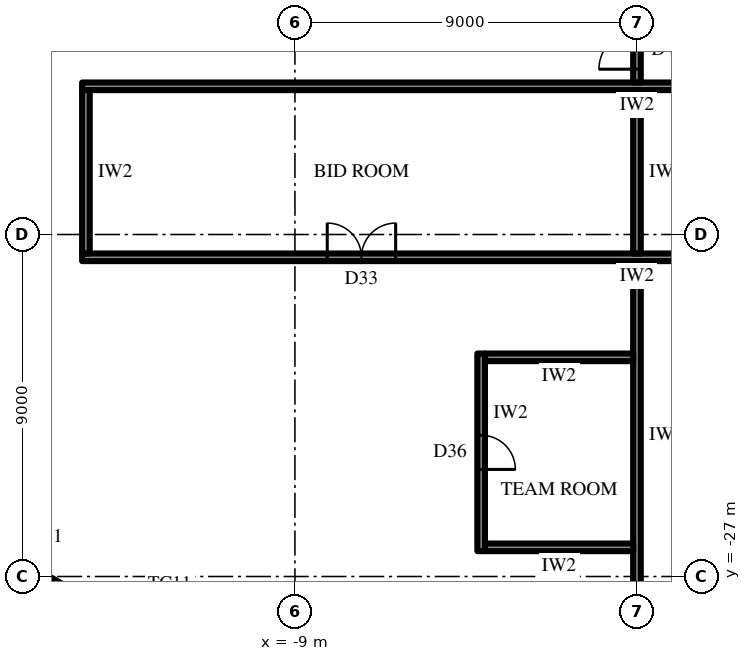
"""IFC4 building model, lengths in metres.
Left out: names, types, materials, properties, quantities, classifications, styles, units other than length and angle.
Written with IfcOpenShell. Run it as: python <this file> out.ifc"""

import sys

from ifc_helpers import new_model, si_unit, direction, frame, frame_2d, origin, place, context, subcontext, project, spatial, rectangle, extrude, element, fill, save


model = new_model("IFC4")
c1 = context("Model", 3, precision=1e-05, world=origin(), true_north=direction((0.0, 1.0)))
c2 = subcontext(c1, "Body", "Model", "MODEL_VIEW")
j1 = project(units=[si_unit("LENGTHUNIT", "METRE"), si_unit("PLANEANGLEUNIT", "RADIAN")], contexts=[c1])
p1 = place(None, origin())
s1 = spatial("IfcSite", under=j1, at=p1, CompositionType="ELEMENT")
p2 = place(p1, origin())
s2 = spatial("IfcBuilding", under=s1, at=p2, CompositionType="ELEMENT")
p3 = place(p2, frame((0.0, 0.0, 257.5)))
s3 = spatial("IfcBuildingStorey", under=s2, at=p3, CompositionType="ELEMENT", Elevation=257.5)
p4 = place(p3, frame((-18.707, -25.299, 0.0), z_axis=(0.0, 0.0, 1.0), x_axis=(0.866010973379, -0.500024993363, 0.0)))
e1 = element("IfcWall", 1, at=p4, inside=s3, PredefinedType="SOLIDWALL", context=c2, shape_type="SweptSolid", body=[
    extrude(rectangle(XDim=7.102, YDim=0.3, at=frame_2d((3.551, 0.0))), origin(), (0.0, 0.0, 1.0), 2.8),
])
p5 = place(p3, frame((14.6, -14.1, 0.0), z_axis=(0.0, 0.0, 1.0), x_axis=(-1.0, 0.0, 0.0)))
e2 = element("IfcWall", 2, at=p5, inside=s3, PredefinedType="PARTITIONING", context=c2, shape_type="SweptSolid", body=[
    extrude(rectangle(XDim=29.2, YDim=0.2, at=frame_2d((14.6, 0.0))), origin(), (0.0, 0.0, 1.0), 4.0),
])
p6 = place(p3, frame((14.6, -18.6, 0.0), z_axis=(0.0, 0.0, 1.0), x_axis=(-1.0, 0.0, 0.0)))
e3 = element("IfcWall", 3, at=p6, inside=s3, PredefinedType="PARTITIONING", context=c2, shape_type="SweptSolid", body=[
    extrude(rectangle(XDim=29.2, YDim=0.2, at=frame_2d((14.6, 0.0))), origin(), (0.0, 0.0, 1.0), 4.0),
])
p7 = place(p6, frame((6.45, 0.0, 0.0)))
e4 = element("IfcOpeningElement", 4, at=p7, cuts=e3, PredefinedType="OPENING", context=c2, shape_type="SweptSolid", body=[
    extrude(rectangle(XDim=1.8, YDim=2.4, at=frame_2d((0.9, 1.2))), frame((0.0, 0.11, 0.0), z_axis=(0.0, -1.0, 0.0), x_axis=(1.0, 0.0, 0.0)), (0.0, 0.0, 1.0), 0.22),
])
p8 = place(p6, frame((20.95, 0.0, 0.0)))
e5 = element("IfcOpeningElement", 5, at=p8, cuts=e3, PredefinedType="OPENING", context=c2, shape_type="SweptSolid", body=[
    extrude(rectangle(XDim=1.8, YDim=2.4, at=frame_2d((0.9, 1.2))), frame((0.0, 0.11, 0.0), z_axis=(0.0, -1.0, 0.0), x_axis=(1.0, 0.0, 0.0)), (0.0, 0.0, 1.0), 0.22),
])
p9 = place(p3, frame((0.0, -14.2, 0.0), z_axis=(0.0, 0.0, 1.0), x_axis=(0.0, -1.0, 0.0)))
e6 = element("IfcWall", 6, at=p9, inside=s3, PredefinedType="PARTITIONING", context=c2, shape_type="SweptSolid", body=[
    extrude(rectangle(XDim=4.3, YDim=0.2, at=frame_2d((2.15, 0.0))), origin(), (0.0, 0.0, 1.0), 2.992),
])
p10 = place(p3, frame((-14.5, -14.2, 0.0), z_axis=(0.0, 0.0, 1.0), x_axis=(0.0, -1.0, 0.0)))
e7 = element("IfcWall", 7, at=p10, inside=s3, PredefinedType="PARTITIONING", context=c2, shape_type="SweptSolid", body=[
    extrude(rectangle(XDim=4.3, YDim=0.2, at=frame_2d((2.15, 0.0))), origin(), (0.0, 0.0, 1.0), 4.0),
])
p11 = place(p3, frame((0.0, -12.3, 0.0), z_axis=(0.0, 0.0, 1.0), x_axis=(0.0, -1.0, 0.0)))
e8 = element("IfcWall", 8, at=p11, inside=s3, PredefinedType="PARTITIONING", context=c2, shape_type="SweptSolid", body=[
    extrude(rectangle(XDim=1.7, YDim=0.2, at=frame_2d((0.85, 0.0))), origin(), (0.0, 0.0, 1.0), 2.992),
])
p12 = place(p11, frame((0.35, 0.0, 0.0)))
e9 = element("IfcOpeningElement", 9, at=p12, cuts=e8, PredefinedType="OPENING", context=c2, shape_type="SweptSolid", body=[
    extrude(rectangle(XDim=1.0, YDim=2.2, at=frame_2d((0.5, 1.1))), frame((0.0, 0.11, 0.0), z_axis=(0.0, -1.0, 0.0), x_axis=(1.0, 0.0, 0.0)), (0.0, 0.0, 1.0), 0.22),
])
p13 = place(p3, frame((0.0, -18.7, 0.0), z_axis=(0.0, 0.0, 1.0), x_axis=(0.0, -1.0, 0.0)))
e10 = element("IfcWall", 10, at=p13, inside=s3, PredefinedType="PARTITIONING", context=c2, shape_type="SweptSolid", body=[
    extrude(rectangle(XDim=9.15, YDim=0.2, at=frame_2d((4.575, 0.0))), origin(), (0.0, 0.0, 1.0), 2.992),
])
p14 = place(p3, frame((-4.1, -21.133, 0.0), z_axis=(0.0, 0.0, 1.0), x_axis=(0.0, -1.0, 0.0)))
e11 = element("IfcWall", 11, at=p14, inside=s3, PredefinedType="PARTITIONING", context=c2, shape_type="SweptSolid", body=[
    extrude(rectangle(XDim=5.2, YDim=0.2, at=frame_2d((2.6, 0.0))), origin(), (0.0, 0.0, 1.0), 4.0),
])
p15 = place(p14, frame((2.15, 0.0, 0.0)))
e12 = element("IfcOpeningElement", 12, at=p15, cuts=e11, PredefinedType="OPENING", context=c2, shape_type="SweptSolid", body=[
    extrude(rectangle(XDim=0.9, YDim=2.2, at=frame_2d((0.45, 1.1))), frame((0.0, 0.11, 0.0), z_axis=(0.0, -1.0, 0.0), x_axis=(1.0, 0.0, 0.0)), (0.0, 0.0, 1.0), 0.22),
])
for number, where, z_axis, x_axis in (
    (13, (-0.1, -21.232, 0.0), (0.0, 0.0, 1.0), (-1.0, 0.0, 0.0)),
    (14, (-0.1, -26.232, 0.0), (0.0, 0.0, 1.0), (-1.0, 0.0, 0.0)),
):
    element("IfcWall", number, at=place(p3, frame(where, z_axis=z_axis, x_axis=x_axis)), inside=s3, PredefinedType="PARTITIONING", context=c2, shape_type="SweptSolid", body=[
        extrude(rectangle(XDim=3.9, YDim=0.2, at=frame_2d((1.95, 0.0))), origin(), (0.0, 0.0, 1.0), 4.0),
    ])
p16 = place(p8, frame((1.8, 0.0, 0.0), z_axis=(0.0, 0.0, 1.0), x_axis=(-1.0, 0.0, 0.0)))
e15 = element("IfcDoor", 15, at=p16, inside=s3, OperationType="DOUBLE_DOOR_SINGLE_SWING", PredefinedType="DOOR", context=c2, shape_type="SweptSolid", body=[
    extrude(rectangle(XDim=1.8, YDim=2.4, at=frame_2d((0.9, 1.2))), frame((0.0, 0.025, 0.0), z_axis=(0.0, -1.0, 0.0), x_axis=(1.0, 0.0, 0.0)), (0.0, 0.0, 1.0), 0.05),
])
fill(e5, e15)
p17 = place(p12, frame((1.0, 0.0, 0.0), z_axis=(0.0, 0.0, 1.0), x_axis=(-1.0, 0.0, 0.0)))
e16 = element("IfcDoor", 16, at=p17, inside=s3, OperationType="SINGLE_SWING_RIGHT", PredefinedType="DOOR", context=c2, shape_type="SweptSolid", body=[
    extrude(rectangle(XDim=1.0, YDim=2.2, at=frame_2d((0.5, 1.1))), frame((0.0, 0.025, 0.0), z_axis=(0.0, -1.0, 0.0), x_axis=(1.0, 0.0, 0.0)), (0.0, 0.0, 1.0), 0.05),
])
fill(e9, e16)
p18 = place(p15, origin())
e17 = element("IfcDoor", 17, at=p18, inside=s3, OperationType="SINGLE_SWING_LEFT", PredefinedType="DOOR", context=c2, shape_type="SweptSolid", body=[
    extrude(rectangle(XDim=0.9, YDim=2.2, at=frame_2d((0.45, 1.1))), frame((0.0, 0.025, 0.0), z_axis=(0.0, -1.0, 0.0), x_axis=(1.0, 0.0, 0.0)), (0.0, 0.0, 1.0), 0.05),
])
fill(e12, e17)
save(model, sys.argv[1])
